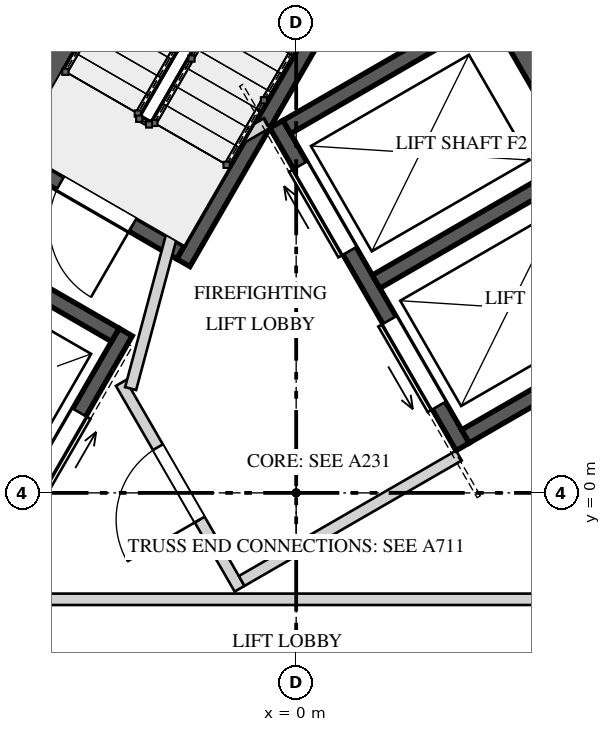
"""IFC4 building model, lengths in metres.
Left out: names, types, materials, properties, quantities, classifications, styles, units other than length and angle.
Written with IfcOpenShell. Run it as: python <this file> out.ifc"""

import sys

from ifc_helpers import new_model, si_unit, direction, frame, frame_2d, origin, place, context, subcontext, project, spatial, rectangle, extrude, element, fill, save


model = new_model("IFC4")
c1 = context("Model", 3, precision=1e-05, world=origin(), true_north=direction((0.0, 1.0)))
c2 = subcontext(c1, "Body", "Model", "MODEL_VIEW")
j1 = project(units=[si_unit("LENGTHUNIT", "METRE"), si_unit("PLANEANGLEUNIT", "RADIAN")], contexts=[c1])
p1 = place(None, origin())
s1 = spatial("IfcSite", under=j1, at=p1, CompositionType="ELEMENT")
p2 = place(p1, origin())
s2 = spatial("IfcBuilding", under=s1, at=p2, CompositionType="ELEMENT")
p3 = place(p2, frame((0.0, 0.0, 232.0)))
s3 = spatial("IfcBuildingStorey", under=s2, at=p3, CompositionType="ELEMENT", Elevation=232.0)
p4 = place(p3, frame((-1.227, 10.625, 0.0), z_axis=(0.0, 0.0, 1.0), x_axis=(-0.500002161919, -0.866024155596, 0.0)))
e1 = element("IfcWall", 1, at=p4, inside=s3, PredefinedType="SHEAR", context=c2, shape_type="SweptSolid", body=[
    extrude(rectangle(XDim=17.176, YDim=0.75, at=frame_2d((8.588, 0.0))), origin(), (0.0, 0.0, 1.0), 5.2),
])
p5 = place(p4, frame((6.793, 0.0, 0.0)))
e2 = element("IfcOpeningElement", 2, at=p5, cuts=e1, PredefinedType="OPENING", context=c2, shape_type="SweptSolid", body=[
    extrude(rectangle(XDim=1.0, YDim=2.4, at=frame_2d((0.5, 1.2))), frame((0.0, 0.385, 0.0), z_axis=(0.0, -1.0, 0.0), x_axis=(1.0, 0.0, 0.0)), (0.0, 0.0, 1.0), 0.77),
])
p6 = place(p3, frame((9.815, -4.25, 0.0), z_axis=(0.0, 0.0, 1.0), x_axis=(-0.500002161919, 0.866024155596, 0.0)))
e3 = element("IfcWall", 3, at=p6, inside=s3, PredefinedType="SHEAR", context=c2, shape_type="SweptSolid", body=[
    extrude(rectangle(XDim=17.176, YDim=0.75, at=frame_2d((8.588, 0.0))), origin(), (0.0, 0.0, 1.0), 5.2),
])
p7 = place(p6, frame((6.863, 0.0, 0.0)))
e4 = element("IfcOpeningElement", 4, at=p7, cuts=e3, PredefinedType="OPENING", context=c2, shape_type="SweptSolid", body=[
    extrude(rectangle(XDim=1.0, YDim=2.4, at=frame_2d((0.5, 1.2))), frame((0.0, 0.385, 0.0), z_axis=(0.0, -1.0, 0.0), x_axis=(1.0, 0.0, 0.0)), (0.0, 0.0, 1.0), 0.77),
])
p8 = place(p6, frame((14.382, 0.0, 0.0)))
e5 = element("IfcOpeningElement", 5, at=p8, cuts=e3, PredefinedType="OPENING", context=c2, shape_type="SweptSolid", body=[
    extrude(rectangle(XDim=0.8, YDim=2.1, at=frame_2d((0.4, 1.05))), frame((0.0, 0.385, 0.0), z_axis=(0.0, -1.0, 0.0), x_axis=(1.0, 0.0, 0.0)), (0.0, 0.0, 1.0), 0.77),
])
p9 = place(p3, frame((-0.831, 9.81, 0.0), z_axis=(0.0, 0.0, 1.0), x_axis=(-0.500009909098, -0.866019682689, 0.0)))
e6 = element("IfcWall", 6, at=p9, inside=s3, PredefinedType="SOLIDWALL", context=c2, shape_type="SweptSolid", body=[
    extrude(rectangle(XDim=6.2, YDim=0.55, at=frame_2d((3.1, 0.0))), origin(), (0.0, 0.0, 1.0), 4.85),
])
p10 = place(p3, frame((1.847, 8.8, 0.0), z_axis=(0.0, 0.0, 1.0), x_axis=(-0.499980354584, -0.866036745774, 0.0)))
e7 = element("IfcWall", 7, at=p10, inside=s3, PredefinedType="SOLIDWALL", context=c2, shape_type="SweptSolid", body=[
    extrude(rectangle(XDim=6.665, YDim=0.2, at=frame_2d((3.333, 0.0))), origin(), (0.0, 0.0, 1.0), 4.85),
])
p11 = place(p3, frame((-1.521, 3.165, 0.0), z_axis=(0.0, 0.0, 1.0), x_axis=(-0.86600983753, 0.500026960575, 0.0)))
e8 = element("IfcWall", 8, at=p11, inside=s3, PredefinedType="SOLIDWALL", context=c2, shape_type="SweptSolid", body=[
    extrude(rectangle(XDim=3.1, YDim=0.2, at=frame_2d((1.55, 0.0))), origin(), (0.0, 0.0, 1.0), 4.85),
])
p12 = place(p11, frame((0.725, 0.0, 0.0)))
e9 = element("IfcOpeningElement", 9, at=p12, cuts=e8, PredefinedType="OPENING", context=c2, shape_type="SweptSolid", body=[
    extrude(rectangle(XDim=1.1, YDim=2.4, at=frame_2d((0.55, 1.2))), frame((0.0, 0.11, 0.0), z_axis=(0.0, -1.0, 0.0), x_axis=(1.0, 0.0, 0.0)), (0.0, 0.0, 1.0), 0.22),
])
p13 = place(p3, frame((-2.243, 2.115, 0.0), z_axis=(0.0, 0.0, 1.0), x_axis=(-0.499996545922, -0.866027397988, 0.0)))
e10 = element("IfcWall", 10, at=p13, inside=s3, PredefinedType="SOLIDWALL", context=c2, shape_type="SweptSolid", body=[
    extrude(rectangle(XDim=5.5, YDim=0.2, at=frame_2d((2.75, 0.0))), origin(), (0.0, 0.0, 1.0), 4.85),
])
p14 = place(p13, frame((1.22, 0.0, 0.0)))
e11 = element("IfcOpeningElement", 11, at=p14, cuts=e10, PredefinedType="OPENING", context=c2, shape_type="SweptSolid", body=[
    extrude(rectangle(XDim=1.1, YDim=2.1, at=frame_2d((0.55, 1.05))), frame((0.0, 0.11, 0.0), z_axis=(0.0, -1.0, 0.0), x_axis=(1.0, 0.0, 0.0)), (0.0, 0.0, 1.0), 0.22),
])
p15 = place(p13, frame((3.525, 0.0, 0.0)))
e12 = element("IfcOpeningElement", 12, at=p15, cuts=e10, PredefinedType="OPENING", context=c2, shape_type="SweptSolid", body=[
    extrude(rectangle(XDim=1.1, YDim=2.1, at=frame_2d((0.55, 1.05))), frame((0.0, 0.11, 0.0), z_axis=(0.0, -1.0, 0.0), x_axis=(1.0, 0.0, 0.0)), (0.0, 0.0, 1.0), 0.22),
])
p16 = place(p3, frame((-2.38, 2.078, 0.0), z_axis=(0.0, 0.0, 1.0), x_axis=(-0.866032775405, 0.499987231761, 0.0)))
e13 = element("IfcWall", 13, at=p16, inside=s3, PredefinedType="SOLIDWALL", context=c2, shape_type="SweptSolid", body=[
    extrude(rectangle(XDim=2.9, YDim=0.2, at=frame_2d((1.45, 0.0))), origin(), (0.0, 0.0, 1.0), 4.85),
])
p17 = place(p3, frame((2.19, 0.606, 0.0), z_axis=(0.0, 0.0, 1.0), x_axis=(-0.500002801628, 0.866023786258, 0.0)))
e14 = element("IfcWall", 14, at=p17, inside=s3, PredefinedType="SOLIDWALL", context=c2, shape_type="SweptSolid", body=[
    extrude(rectangle(XDim=4.9, YDim=0.2, at=frame_2d((2.45, 0.0))), origin(), (0.0, 0.0, 1.0), 4.85),
])
p18 = place(p17, frame((0.625, 0.0, 0.0)))
e15 = element("IfcOpeningElement", 15, at=p18, cuts=e14, PredefinedType="OPENING", context=c2, shape_type="SweptSolid", body=[
    extrude(rectangle(XDim=1.3, YDim=2.1, at=frame_2d((0.65, 1.05))), frame((0.0, 0.11, 0.0), z_axis=(0.0, -1.0, 0.0), x_axis=(1.0, 0.0, 0.0)), (0.0, 0.0, 1.0), 0.22),
])
p19 = place(p17, frame((2.975, 0.0, 0.0)))
e16 = element("IfcOpeningElement", 16, at=p19, cuts=e14, PredefinedType="OPENING", context=c2, shape_type="SweptSolid", body=[
    extrude(rectangle(XDim=1.3, YDim=2.1, at=frame_2d((0.65, 1.05))), frame((0.0, 0.11, 0.0), z_axis=(0.0, -1.0, 0.0), x_axis=(1.0, 0.0, 0.0)), (0.0, 0.0, 1.0), 0.22),
])
p20 = place(p3, frame((5.156, 2.319, 0.0), z_axis=(0.0, 0.0, 1.0), x_axis=(-0.500018594424, 0.866014668023, 0.0)))
e17 = element("IfcWall", 17, at=p20, inside=s3, PredefinedType="SOLIDWALL", context=c2, shape_type="SweptSolid", body=[
    extrude(rectangle(XDim=4.9, YDim=0.55, at=frame_2d((2.45, 0.0))), origin(), (0.0, 0.0, 1.0), 4.85),
])
for number, where, z_axis, x_axis in (
    (18, (2.227, 0.743, 0.0), (0.0, 0.0, 1.0), (0.866, 0.5, 0.0)),
    (19, (1.052, 2.778, 0.0), (0.0, 0.0, 1.0), (0.866, 0.5, 0.0)),
):
    element("IfcWall", number, at=place(p3, frame(where, z_axis=z_axis, x_axis=x_axis)), inside=s3, PredefinedType="SOLIDWALL", context=c2, shape_type="SweptSolid", body=[
        extrude(rectangle(XDim=3.7, YDim=0.2, at=frame_2d((1.85, 0.0))), origin(), (0.0, 0.0, 1.0), 4.85),
    ])
p21 = place(p3, frame((-0.123, 4.813, 0.0), z_axis=(0.0, 0.0, 1.0), x_axis=(0.866000971088, 0.500042316284, 0.0)))
e20 = element("IfcWall", 20, at=p21, inside=s3, PredefinedType="SOLIDWALL", context=c2, shape_type="SweptSolid", body=[
    extrude(rectangle(XDim=3.7, YDim=0.2, at=frame_2d((1.85, 0.0))), origin(), (0.0, 0.0, 1.0), 4.85),
])
p22 = place(p3, frame((-0.744, -1.261, 0.0), z_axis=(0.0, 0.0, 1.0), x_axis=(-0.500004234368, 0.866022959057, 0.0)))
e21 = element("IfcWall", 21, at=p22, inside=s3, PredefinedType="PARTITIONING", context=c2, shape_type="SweptSolid", body=[
    extrude(rectangle(XDim=3.125, YDim=0.15, at=frame_2d((1.562, 0.0))), origin(), (0.0, 0.0, 1.0), 4.85),
])
p23 = place(p22, frame((1.05, 0.0, 0.0)))
e22 = element("IfcOpeningElement", 22, at=p23, cuts=e21, PredefinedType="OPENING", context=c2, shape_type="SweptSolid", body=[
    extrude(rectangle(XDim=1.1, YDim=2.4, at=frame_2d((0.55, 1.2))), frame((0.0, 0.085, 0.0), z_axis=(0.0, -1.0, 0.0), x_axis=(1.0, 0.0, 0.0)), (0.0, 0.0, 1.0), 0.17),
])
p24 = place(p3, frame((-0.717, -1.159, 0.0), z_axis=(0.0, 0.0, 1.0), x_axis=(0.866008176907, 0.50002983664, 0.0)))
e23 = element("IfcWall", 23, at=p24, inside=s3, PredefinedType="PARTITIONING", context=c2, shape_type="SweptSolid", body=[
    extrude(rectangle(XDim=3.3, YDim=0.15, at=frame_2d((1.65, 0.0))), origin(), (0.0, 0.0, 1.0), 4.85),
])
p25 = place(p3, frame((-2.178, 1.372, 0.0), z_axis=(0.0, 0.0, 1.0), x_axis=(0.258808958833, 0.96592852884, 0.0)))
e24 = element("IfcWall", 24, at=p25, inside=s3, PredefinedType="PARTITIONING", context=c2, shape_type="SweptSolid", body=[
    extrude(rectangle(XDim=2.903, YDim=0.15, at=frame_2d((1.451, 0.0))), origin(), (0.0, 0.0, 1.0), 4.85),
])
p26 = place(p3, frame((-1.51, 4.215, 0.0), z_axis=(0.0, 0.0, 1.0), x_axis=(0.866085525409, 0.49989585183, 0.0)))
e25 = element("IfcWall", 25, at=p26, inside=s3, PredefinedType="PARTITIONING", context=c2, shape_type="SweptSolid", body=[
    extrude(rectangle(XDim=1.3, YDim=0.15, at=frame_2d((0.65, 0.0))), origin(), (0.0, 0.0, 1.0), 4.85),
])
p27 = place(p3, frame((-4.053, -1.4, 0.0), z_axis=(0.0, 0.0, 1.0), x_axis=(1.0, 0.0, 0.0)))
e26 = element("IfcWall", 26, at=p27, inside=s3, PredefinedType="PARTITIONING", context=c2, shape_type="SweptSolid", body=[
    extrude(rectangle(XDim=7.876, YDim=0.15, at=frame_2d((3.938, 0.0))), origin(), (0.0, 0.0, 1.0), 4.85),
])
p28 = place(p12, origin())
e27 = element("IfcDoor", 27, at=p28, inside=s3, OperationType="SINGLE_SWING_RIGHT", PredefinedType="DOOR", context=c2, shape_type="SweptSolid", body=[
    extrude(rectangle(XDim=1.1, YDim=2.4, at=frame_2d((0.55, 1.2))), frame((0.0, 0.025, 0.0), z_axis=(0.0, -1.0, 0.0), x_axis=(1.0, 0.0, 0.0)), (0.0, 0.0, 1.0), 0.05),
])
fill(e9, e27)
p29 = place(p14, origin())
e28 = element("IfcDoor", 28, at=p29, inside=s3, OperationType="SLIDING_TO_LEFT", PredefinedType="DOOR", context=c2, shape_type="SweptSolid", body=[
    extrude(rectangle(XDim=1.1, YDim=2.1, at=frame_2d((0.55, 1.05))), frame((0.0, 0.025, 0.0), z_axis=(0.0, -1.0, 0.0), x_axis=(1.0, 0.0, 0.0)), (0.0, 0.0, 1.0), 0.05),
])
fill(e11, e28)
p30 = place(p18, origin())
e29 = element("IfcDoor", 29, at=p30, inside=s3, OperationType="SLIDING_TO_LEFT", PredefinedType="DOOR", context=c2, shape_type="SweptSolid", body=[
    extrude(rectangle(XDim=1.3, YDim=2.1, at=frame_2d((0.65, 1.05))), frame((0.0, 0.025, 0.0), z_axis=(0.0, -1.0, 0.0), x_axis=(1.0, 0.0, 0.0)), (0.0, 0.0, 1.0), 0.05),
])
fill(e15, e29)
p31 = place(p19, origin())
e30 = element("IfcDoor", 30, at=p31, inside=s3, OperationType="SLIDING_TO_RIGHT", PredefinedType="DOOR", context=c2, shape_type="SweptSolid", body=[
    extrude(rectangle(XDim=1.3, YDim=2.1, at=frame_2d((0.65, 1.05))), frame((0.0, 0.025, 0.0), z_axis=(0.0, -1.0, 0.0), x_axis=(1.0, 0.0, 0.0)), (0.0, 0.0, 1.0), 0.05),
])
fill(e16, e30)
p32 = place(p23, origin())
e31 = element("IfcDoor", 31, at=p32, inside=s3, OperationType="SINGLE_SWING_LEFT", PredefinedType="DOOR", context=c2, shape_type="SweptSolid", body=[
    extrude(rectangle(XDim=1.1, YDim=2.4, at=frame_2d((0.55, 1.2))), frame((0.0, 0.025, 0.0), z_axis=(0.0, -1.0, 0.0), x_axis=(1.0, 0.0, 0.0)), (0.0, 0.0, 1.0), 0.05),
])
fill(e22, e31)
save(model, sys.argv[1])
